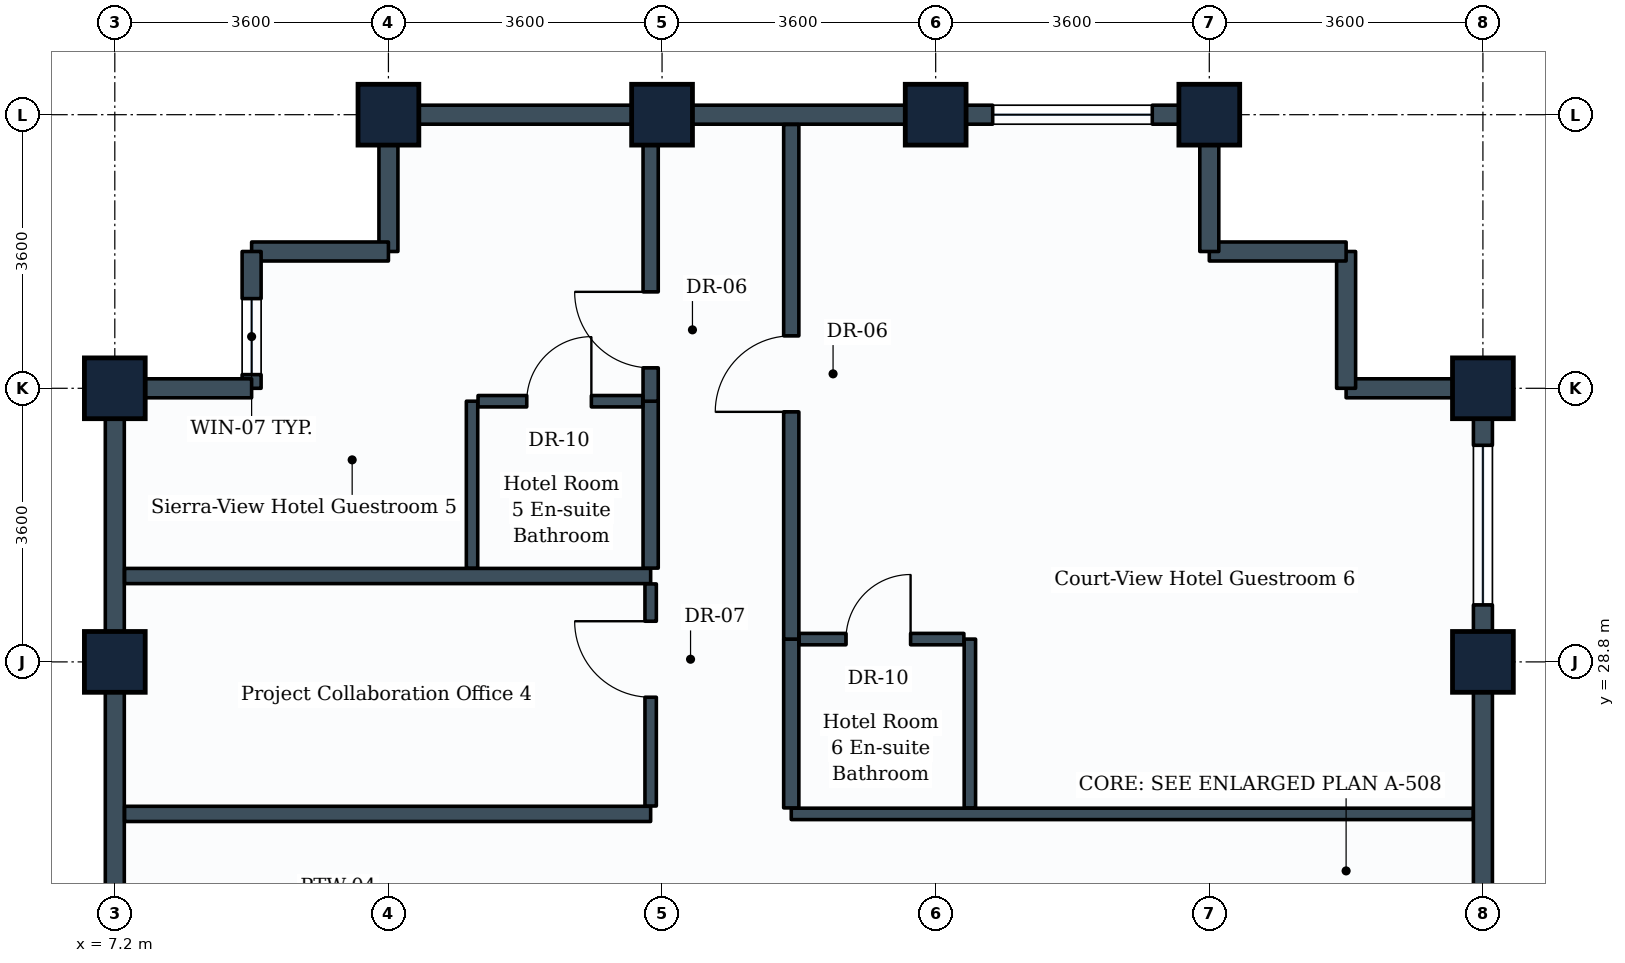
"""IFC4 building model, lengths in metres.
Left out: names, types, materials, properties, quantities, classifications, styles, units other than length and angle.
Written with IfcOpenShell. Run it as: python <this file> out.ifc"""

import sys

from ifc_helpers import new_model, si_unit, direction, frame, frame_2d, origin, origin_2d, place, context, subcontext, project, spatial, rectangle, extrude, element, fill, save


model = new_model("IFC4")
c1 = context("Model", 3, precision=1e-05, world=origin(), true_north=direction((0.0, 1.0)))
c2 = subcontext(c1, "Body", "Model", "MODEL_VIEW")
j1 = project(units=[si_unit("LENGTHUNIT", "METRE"), si_unit("PLANEANGLEUNIT", "RADIAN")], contexts=[c1])
p1 = place(None, origin())
s1 = spatial("IfcSite", under=j1, at=p1, CompositionType="ELEMENT")
p2 = place(p1, origin())
s2 = spatial("IfcBuilding", under=s1, at=p2, CompositionType="ELEMENT")
p3 = place(p2, frame((0.0, 0.0, 239.0)))
s3 = spatial("IfcBuildingStorey", under=s2, at=p3, CompositionType="ELEMENT", Elevation=239.0)
for number, where, z_axis, x_axis in (
    (1, (7.2, 28.8, 0.0), (0.0, 0.0, 1.0), (0.0, 1.0, 0.0)),
    (2, (7.2, 32.4, 0.0), (0.0, 0.0, 1.0), (0.0, 1.0, 0.0)),
    (3, (10.8, 36.0, 0.0), (0.0, 0.0, 1.0), (1.0, 0.0, 0.0)),
    (4, (14.4, 36.0, 0.0), (0.0, 0.0, 1.0), (1.0, 0.0, 0.0)),
    (5, (18.0, 36.0, 0.0), (0.0, 0.0, 1.0), (1.0, 0.0, 0.0)),
    (6, (21.6, 36.0, 0.0), (0.0, 0.0, 1.0), (1.0, 0.0, 0.0)),
    (7, (25.2, 28.8, 0.0), (0.0, 0.0, 1.0), (0.0, 1.0, 0.0)),
    (8, (25.2, 32.4, 0.0), (0.0, 0.0, 1.0), (0.0, 1.0, 0.0)),
):
    element("IfcColumn", number, at=place(p3, frame(where, z_axis=z_axis, x_axis=x_axis)), inside=s3, PredefinedType="COLUMN", context=c2, shape_type="SweptSolid", body=[
        extrude(rectangle(XDim=0.8, YDim=0.8, at=origin_2d()), origin(), (0.0, 0.0, 1.0), 3.6),
    ])
p4 = place(p3, frame((25.2, 28.8, 0.0), z_axis=(0.0, 0.0, 1.0), x_axis=(0.0, -1.0, 0.0)))
e9 = element("IfcWall", 9, at=p4, inside=s3, PredefinedType="STANDARD", context=c2, shape_type="SweptSolid", body=[
    extrude(rectangle(XDim=3.6, YDim=0.25, at=frame_2d((1.8, 0.0))), origin(), (0.0, 0.0, 1.0), 2.83),
])
p5 = place(p3, frame((25.2, 32.4, 0.0), z_axis=(0.0, 0.0, 1.0), x_axis=(0.0, -1.0, 0.0)))
e10 = element("IfcWall", 10, at=p5, inside=s3, PredefinedType="STANDARD", context=c2, shape_type="SweptSolid", body=[
    extrude(rectangle(XDim=3.6, YDim=0.25, at=frame_2d((1.8, 0.0))), origin(), (0.0, 0.0, 1.0), 2.83),
])
p6 = place(p5, frame((0.75, 0.0, 0.85)))
e11 = element("IfcOpeningElement", 11, at=p6, cuts=e10, PredefinedType="OPENING", context=c2, shape_type="SweptSolid", body=[
    extrude(rectangle(XDim=2.1, YDim=1.35, at=frame_2d((1.05, 0.675))), frame((0.0, 0.135, 0.0), z_axis=(0.0, -1.0, 0.0), x_axis=(1.0, 0.0, 0.0)), (0.0, 0.0, 1.0), 0.27),
])
p7 = place(p3, frame((23.4, 32.4, 0.0), z_axis=(0.0, 0.0, 1.0), x_axis=(1.0, 0.0, 0.0)))
e12 = element("IfcWall", 12, at=p7, inside=s3, PredefinedType="STANDARD", context=c2, shape_type="SweptSolid", body=[
    extrude(rectangle(XDim=1.8, YDim=0.25, at=frame_2d((0.9, 0.0))), origin(), (0.0, 0.0, 1.0), 2.83),
])
p8 = place(p3, frame((23.4, 32.4, 0.0), z_axis=(0.0, 0.0, 1.0), x_axis=(0.0, 1.0, 0.0)))
e13 = element("IfcWall", 13, at=p8, inside=s3, PredefinedType="STANDARD", context=c2, shape_type="SweptSolid", body=[
    extrude(rectangle(XDim=1.8, YDim=0.25, at=frame_2d((0.9, 0.0))), origin(), (0.0, 0.0, 1.0), 3.335),
])
p9 = place(p3, frame((21.6, 34.2, 0.0), z_axis=(0.0, 0.0, 1.0), x_axis=(1.0, 0.0, 0.0)))
e14 = element("IfcWall", 14, at=p9, inside=s3, PredefinedType="STANDARD", context=c2, shape_type="SweptSolid", body=[
    extrude(rectangle(XDim=1.8, YDim=0.25, at=frame_2d((0.9, 0.0))), origin(), (0.0, 0.0, 1.0), 3.335),
])
p10 = place(p3, frame((21.6, 34.2, 0.0), z_axis=(0.0, 0.0, 1.0), x_axis=(0.0, 1.0, 0.0)))
e15 = element("IfcWall", 15, at=p10, inside=s3, PredefinedType="STANDARD", context=c2, shape_type="SweptSolid", body=[
    extrude(rectangle(XDim=1.8, YDim=0.25, at=frame_2d((0.9, 0.0))), origin(), (0.0, 0.0, 1.0), 2.83),
])
p11 = place(p3, frame((18.0, 36.0, 0.0), z_axis=(0.0, 0.0, 1.0), x_axis=(1.0, 0.0, 0.0)))
e16 = element("IfcWall", 16, at=p11, inside=s3, PredefinedType="STANDARD", context=c2, shape_type="SweptSolid", body=[
    extrude(rectangle(XDim=3.6, YDim=0.25, at=frame_2d((1.8, 0.0))), origin(), (0.0, 0.0, 1.0), 2.83),
])
p12 = place(p11, frame((0.75, 0.0, 0.85)))
e17 = element("IfcOpeningElement", 17, at=p12, cuts=e16, PredefinedType="OPENING", context=c2, shape_type="SweptSolid", body=[
    extrude(rectangle(XDim=2.1, YDim=1.35, at=frame_2d((1.05, 0.675))), frame((0.0, 0.135, 0.0), z_axis=(0.0, -1.0, 0.0), x_axis=(1.0, 0.0, 0.0)), (0.0, 0.0, 1.0), 0.27),
])
p13 = place(p3, frame((14.4, 36.0, 0.0), z_axis=(0.0, 0.0, 1.0), x_axis=(1.0, 0.0, 0.0)))
e18 = element("IfcWall", 18, at=p13, inside=s3, PredefinedType="STANDARD", context=c2, shape_type="SweptSolid", body=[
    extrude(rectangle(XDim=3.6, YDim=0.25, at=frame_2d((1.8, 0.0))), origin(), (0.0, 0.0, 1.0), 2.83),
])
p14 = place(p3, frame((10.8, 36.0, 0.0), z_axis=(0.0, 0.0, 1.0), x_axis=(1.0, 0.0, 0.0)))
e19 = element("IfcWall", 19, at=p14, inside=s3, PredefinedType="STANDARD", context=c2, shape_type="SweptSolid", body=[
    extrude(rectangle(XDim=3.6, YDim=0.25, at=frame_2d((1.8, 0.0))), origin(), (0.0, 0.0, 1.0), 2.83),
])
p15 = place(p3, frame((10.8, 34.2, 0.0), z_axis=(0.0, 0.0, 1.0), x_axis=(0.0, 1.0, 0.0)))
e20 = element("IfcWall", 20, at=p15, inside=s3, PredefinedType="STANDARD", context=c2, shape_type="SweptSolid", body=[
    extrude(rectangle(XDim=1.8, YDim=0.25, at=frame_2d((0.9, 0.0))), origin(), (0.0, 0.0, 1.0), 2.83),
])
p16 = place(p3, frame((9.0, 34.2, 0.0), z_axis=(0.0, 0.0, 1.0), x_axis=(1.0, 0.0, 0.0)))
e21 = element("IfcWall", 21, at=p16, inside=s3, PredefinedType="STANDARD", context=c2, shape_type="SweptSolid", body=[
    extrude(rectangle(XDim=1.8, YDim=0.25, at=frame_2d((0.9, 0.0))), origin(), (0.0, 0.0, 1.0), 3.335),
])
p17 = place(p3, frame((9.0, 32.4, 0.0), z_axis=(0.0, 0.0, 1.0), x_axis=(0.0, 1.0, 0.0)))
e22 = element("IfcWall", 22, at=p17, inside=s3, PredefinedType="STANDARD", context=c2, shape_type="SweptSolid", body=[
    extrude(rectangle(XDim=1.8, YDim=0.25, at=frame_2d((0.9, 0.0))), origin(), (0.0, 0.0, 1.0), 3.335),
])
p18 = place(p17, frame((0.18, 0.0, 0.85)))
e23 = element("IfcOpeningElement", 23, at=p18, cuts=e22, PredefinedType="OPENING", context=c2, shape_type="SweptSolid", body=[
    extrude(rectangle(XDim=1.0, YDim=1.35, at=frame_2d((0.5, 0.675))), frame((0.0, 0.135, 0.0), z_axis=(0.0, -1.0, 0.0), x_axis=(1.0, 0.0, 0.0)), (0.0, 0.0, 1.0), 0.27),
])
p19 = place(p3, frame((7.2, 32.4, 0.0), z_axis=(0.0, 0.0, 1.0), x_axis=(1.0, 0.0, 0.0)))
e24 = element("IfcWall", 24, at=p19, inside=s3, PredefinedType="STANDARD", context=c2, shape_type="SweptSolid", body=[
    extrude(rectangle(XDim=1.8, YDim=0.25, at=frame_2d((0.9, 0.0))), origin(), (0.0, 0.0, 1.0), 2.83),
])
p20 = place(p3, frame((7.2, 28.8, 0.0), z_axis=(0.0, 0.0, 1.0), x_axis=(0.0, 1.0, 0.0)))
e25 = element("IfcWall", 25, at=p20, inside=s3, PredefinedType="STANDARD", context=c2, shape_type="SweptSolid", body=[
    extrude(rectangle(XDim=3.6, YDim=0.25, at=frame_2d((1.8, 0.0))), origin(), (0.0, 0.0, 1.0), 2.83),
])
p21 = place(p3, frame((7.2, 25.2, 0.0), z_axis=(0.0, 0.0, 1.0), x_axis=(0.0, 1.0, 0.0)))
e26 = element("IfcWall", 26, at=p21, inside=s3, PredefinedType="STANDARD", context=c2, shape_type="SweptSolid", body=[
    extrude(rectangle(XDim=3.6, YDim=0.25, at=frame_2d((1.8, 0.0))), origin(), (0.0, 0.0, 1.0), 2.83),
])
for number, where, z_axis, x_axis in (
    (27, (7.329, 26.8, 0.0), (0.0, 0.0, 1.0), (1.0, 0.0, 0.0)),
    (28, (7.329, 29.93, 0.0), (0.0, 0.0, 1.0), (1.0, 0.0, 0.0)),
):
    element("IfcWall", number, at=place(p3, frame(where, z_axis=z_axis, x_axis=x_axis)), inside=s3, PredefinedType="PARTITIONING", context=c2, shape_type="SweptSolid", body=[
        extrude(rectangle(XDim=6.921, YDim=0.2, at=frame_2d((3.46, 0.0))), origin(), (0.0, 0.0, 1.0), 2.83),
    ])
p22 = place(p3, frame((14.25, 26.904, 0.0), z_axis=(0.0, 0.0, 1.0), x_axis=(0.0, 1.0, 0.0)))
e29 = element("IfcWall", 29, at=p22, inside=s3, PredefinedType="PARTITIONING", context=c2, shape_type="SweptSolid", body=[
    extrude(rectangle(XDim=2.922, YDim=0.15, at=frame_2d((1.461, 0.0))), origin(), (0.0, 0.0, 1.0), 3.03),
])
p23 = place(p22, frame((1.431, 0.0, 0.0)))
e30 = element("IfcOpeningElement", 30, at=p23, cuts=e29, PredefinedType="OPENING", context=c2, shape_type="SweptSolid", body=[
    extrude(rectangle(XDim=1.0, YDim=2.1, at=frame_2d((0.5, 1.05))), frame((0.0, 0.085, 0.0), z_axis=(0.0, -1.0, 0.0), x_axis=(1.0, 0.0, 0.0)), (0.0, 0.0, 1.0), 0.17),
])
p24 = place(p3, frame((14.25, 30.034, 0.0), z_axis=(0.0, 0.0, 1.0), x_axis=(0.0, 1.0, 0.0)))
e31 = element("IfcWall", 31, at=p24, inside=s3, PredefinedType="PARTITIONING", context=c2, shape_type="SweptSolid", body=[
    extrude(rectangle(XDim=2.196, YDim=0.2, at=frame_2d((1.098, 0.0))), origin(), (0.0, 0.0, 1.0), 3.335),
])
p25 = place(p3, frame((14.25, 32.23, 0.0), z_axis=(0.0, 0.0, 1.0), x_axis=(0.0, 1.0, 0.0)))
e32 = element("IfcWall", 32, at=p25, inside=s3, PredefinedType="PARTITIONING", context=c2, shape_type="SweptSolid", body=[
    extrude(rectangle(XDim=3.641, YDim=0.2, at=frame_2d((1.821, 0.0))), origin(), (0.0, 0.0, 1.0), 2.83),
])
p26 = place(p25, frame((0.439, 0.0, 0.0)))
e33 = element("IfcOpeningElement", 33, at=p26, cuts=e32, PredefinedType="OPENING", context=c2, shape_type="SweptSolid", body=[
    extrude(rectangle(XDim=1.0, YDim=2.1, at=frame_2d((0.5, 1.05))), frame((0.0, 0.11, 0.0), z_axis=(0.0, -1.0, 0.0), x_axis=(1.0, 0.0, 0.0)), (0.0, 0.0, 1.0), 0.22),
])
p27 = place(p3, frame((11.9, 30.034, 0.0), z_axis=(0.0, 0.0, 1.0), x_axis=(0.0, 1.0, 0.0)))
e34 = element("IfcWall", 34, at=p27, inside=s3, PredefinedType="PARTITIONING", context=c2, shape_type="SweptSolid", body=[
    extrude(rectangle(XDim=2.196, YDim=0.15, at=frame_2d((1.098, 0.0))), origin(), (0.0, 0.0, 1.0), 3.335),
])
p28 = place(p3, frame((11.979, 32.23, 0.0), z_axis=(0.0, 0.0, 1.0), x_axis=(1.0, 0.0, 0.0)))
e35 = element("IfcWall", 35, at=p28, inside=s3, PredefinedType="PARTITIONING", context=c2, shape_type="SweptSolid", body=[
    extrude(rectangle(XDim=2.167, YDim=0.15, at=frame_2d((1.083, 0.0))), origin(), (0.0, 0.0, 1.0), 3.335),
])
p29 = place(p28, frame((0.641, 0.0, 0.0)))
e36 = element("IfcOpeningElement", 36, at=p29, cuts=e35, PredefinedType="OPENING", context=c2, shape_type="SweptSolid", body=[
    extrude(rectangle(XDim=0.85, YDim=2.1, at=frame_2d((0.425, 1.05))), frame((0.0, 0.085, 0.0), z_axis=(0.0, -1.0, 0.0), x_axis=(1.0, 0.0, 0.0)), (0.0, 0.0, 1.0), 0.17),
])
p30 = place(p3, frame((16.1, 26.8, 0.0), z_axis=(0.0, 0.0, 1.0), x_axis=(1.0, 0.0, 0.0)))
e37 = element("IfcWall", 37, at=p30, inside=s3, PredefinedType="PARTITIONING", context=c2, shape_type="SweptSolid", body=[
    extrude(rectangle(XDim=8.971, YDim=0.15, at=frame_2d((4.485, 0.0))), origin(), (0.0, 0.0, 1.0), 2.83),
])
p31 = place(p3, frame((16.1, 26.879, 0.0), z_axis=(0.0, 0.0, 1.0), x_axis=(0.0, 1.0, 0.0)))
e38 = element("IfcWall", 38, at=p31, inside=s3, PredefinedType="PARTITIONING", context=c2, shape_type="SweptSolid", body=[
    extrude(rectangle(XDim=2.221, YDim=0.2, at=frame_2d((1.111, 0.0))), origin(), (0.0, 0.0, 1.0), 3.03),
])
p32 = place(p3, frame((16.1, 29.1, 0.0), z_axis=(0.0, 0.0, 1.0), x_axis=(0.0, 1.0, 0.0)))
e39 = element("IfcWall", 39, at=p32, inside=s3, PredefinedType="PARTITIONING", context=c2, shape_type="SweptSolid", body=[
    extrude(rectangle(XDim=6.771, YDim=0.2, at=frame_2d((3.385, 0.0))), origin(), (0.0, 0.0, 1.0), 2.83),
])
p33 = place(p32, frame((2.99, 0.0, 0.0)))
e40 = element("IfcOpeningElement", 40, at=p33, cuts=e39, PredefinedType="OPENING", context=c2, shape_type="SweptSolid", body=[
    extrude(rectangle(XDim=1.0, YDim=2.1, at=frame_2d((0.5, 1.05))), frame((0.0, 0.11, 0.0), z_axis=(0.0, -1.0, 0.0), x_axis=(1.0, 0.0, 0.0)), (0.0, 0.0, 1.0), 0.22),
])
p34 = place(p3, frame((18.45, 26.879, 0.0), z_axis=(0.0, 0.0, 1.0), x_axis=(0.0, 1.0, 0.0)))
e41 = element("IfcWall", 41, at=p34, inside=s3, PredefinedType="PARTITIONING", context=c2, shape_type="SweptSolid", body=[
    extrude(rectangle(XDim=2.221, YDim=0.15, at=frame_2d((1.111, 0.0))), origin(), (0.0, 0.0, 1.0), 3.03),
])
p35 = place(p3, frame((16.204, 29.1, 0.0), z_axis=(0.0, 0.0, 1.0), x_axis=(1.0, 0.0, 0.0)))
e42 = element("IfcWall", 42, at=p35, inside=s3, PredefinedType="PARTITIONING", context=c2, shape_type="SweptSolid", body=[
    extrude(rectangle(XDim=2.167, YDim=0.15, at=frame_2d((1.083, 0.0))), origin(), (0.0, 0.0, 1.0), 3.03),
])
p36 = place(p35, frame((0.616, 0.0, 0.0)))
e43 = element("IfcOpeningElement", 43, at=p36, cuts=e42, PredefinedType="OPENING", context=c2, shape_type="SweptSolid", body=[
    extrude(rectangle(XDim=0.85, YDim=2.1, at=frame_2d((0.425, 1.05))), frame((0.0, 0.085, 0.0), z_axis=(0.0, -1.0, 0.0), x_axis=(1.0, 0.0, 0.0)), (0.0, 0.0, 1.0), 0.17),
])
p37 = place(p6, origin())
e44 = element("IfcWindow", 44, at=p37, inside=s3, PartitioningType="SINGLE_PANEL", PredefinedType="WINDOW", context=c2, shape_type="SweptSolid", body=[
    extrude(rectangle(XDim=2.1, YDim=1.35, at=frame_2d((1.05, 0.675))), frame((0.0, 0.03, 0.0), z_axis=(0.0, -1.0, 0.0), x_axis=(1.0, 0.0, 0.0)), (0.0, 0.0, 1.0), 0.06),
])
fill(e11, e44)
p38 = place(p12, origin())
e45 = element("IfcWindow", 45, at=p38, inside=s3, PartitioningType="SINGLE_PANEL", PredefinedType="WINDOW", context=c2, shape_type="SweptSolid", body=[
    extrude(rectangle(XDim=2.1, YDim=1.35, at=frame_2d((1.05, 0.675))), frame((0.0, 0.03, 0.0), z_axis=(0.0, -1.0, 0.0), x_axis=(1.0, 0.0, 0.0)), (0.0, 0.0, 1.0), 0.06),
])
fill(e17, e45)
p39 = place(p23, origin())
e46 = element("IfcDoor", 46, at=p39, inside=s3, OperationType="SINGLE_SWING_RIGHT", PredefinedType="DOOR", context=c2, shape_type="SweptSolid", body=[
    extrude(rectangle(XDim=1.0, YDim=2.1, at=frame_2d((0.5, 1.05))), frame((0.0, 0.025, 0.0), z_axis=(0.0, -1.0, 0.0), x_axis=(1.0, 0.0, 0.0)), (0.0, 0.0, 1.0), 0.05),
])
fill(e30, e46)
p40 = place(p26, origin())
e47 = element("IfcDoor", 47, at=p40, inside=s3, OperationType="SINGLE_SWING_RIGHT", PredefinedType="DOOR", context=c2, shape_type="SweptSolid", body=[
    extrude(rectangle(XDim=1.0, YDim=2.1, at=frame_2d((0.5, 1.05))), frame((0.0, 0.025, 0.0), z_axis=(0.0, -1.0, 0.0), x_axis=(1.0, 0.0, 0.0)), (0.0, 0.0, 1.0), 0.05),
])
fill(e33, e47)
p41 = place(p29, origin())
e48 = element("IfcDoor", 48, at=p41, inside=s3, OperationType="SINGLE_SWING_RIGHT", PredefinedType="DOOR", context=c2, shape_type="SweptSolid", body=[
    extrude(rectangle(XDim=0.85, YDim=2.1, at=frame_2d((0.425, 1.05))), frame((0.0, 0.025, 0.0), z_axis=(0.0, -1.0, 0.0), x_axis=(1.0, 0.0, 0.0)), (0.0, 0.0, 1.0), 0.05),
])
fill(e36, e48)
p42 = place(p33, origin())
e49 = element("IfcDoor", 49, at=p42, inside=s3, OperationType="SINGLE_SWING_LEFT", PredefinedType="DOOR", context=c2, shape_type="SweptSolid", body=[
    extrude(rectangle(XDim=1.0, YDim=2.1, at=frame_2d((0.5, 1.05))), frame((0.0, 0.025, 0.0), z_axis=(0.0, -1.0, 0.0), x_axis=(1.0, 0.0, 0.0)), (0.0, 0.0, 1.0), 0.05),
])
fill(e40, e49)
p43 = place(p36, origin())
e50 = element("IfcDoor", 50, at=p43, inside=s3, OperationType="SINGLE_SWING_RIGHT", PredefinedType="DOOR", context=c2, shape_type="SweptSolid", body=[
    extrude(rectangle(XDim=0.85, YDim=2.1, at=frame_2d((0.425, 1.05))), frame((0.0, 0.025, 0.0), z_axis=(0.0, -1.0, 0.0), x_axis=(1.0, 0.0, 0.0)), (0.0, 0.0, 1.0), 0.05),
])
fill(e43, e50)
p44 = place(p18, origin())
e51 = element("IfcWindow", 51, at=p44, inside=s3, PartitioningType="SINGLE_PANEL", PredefinedType="WINDOW", context=c2, shape_type="SweptSolid", body=[
    extrude(rectangle(XDim=1.0, YDim=1.35, at=frame_2d((0.5, 0.675))), frame((0.0, 0.03, 0.0), z_axis=(0.0, -1.0, 0.0), x_axis=(1.0, 0.0, 0.0)), (0.0, 0.0, 1.0), 0.06),
])
fill(e23, e51)
save(model, sys.argv[1])
